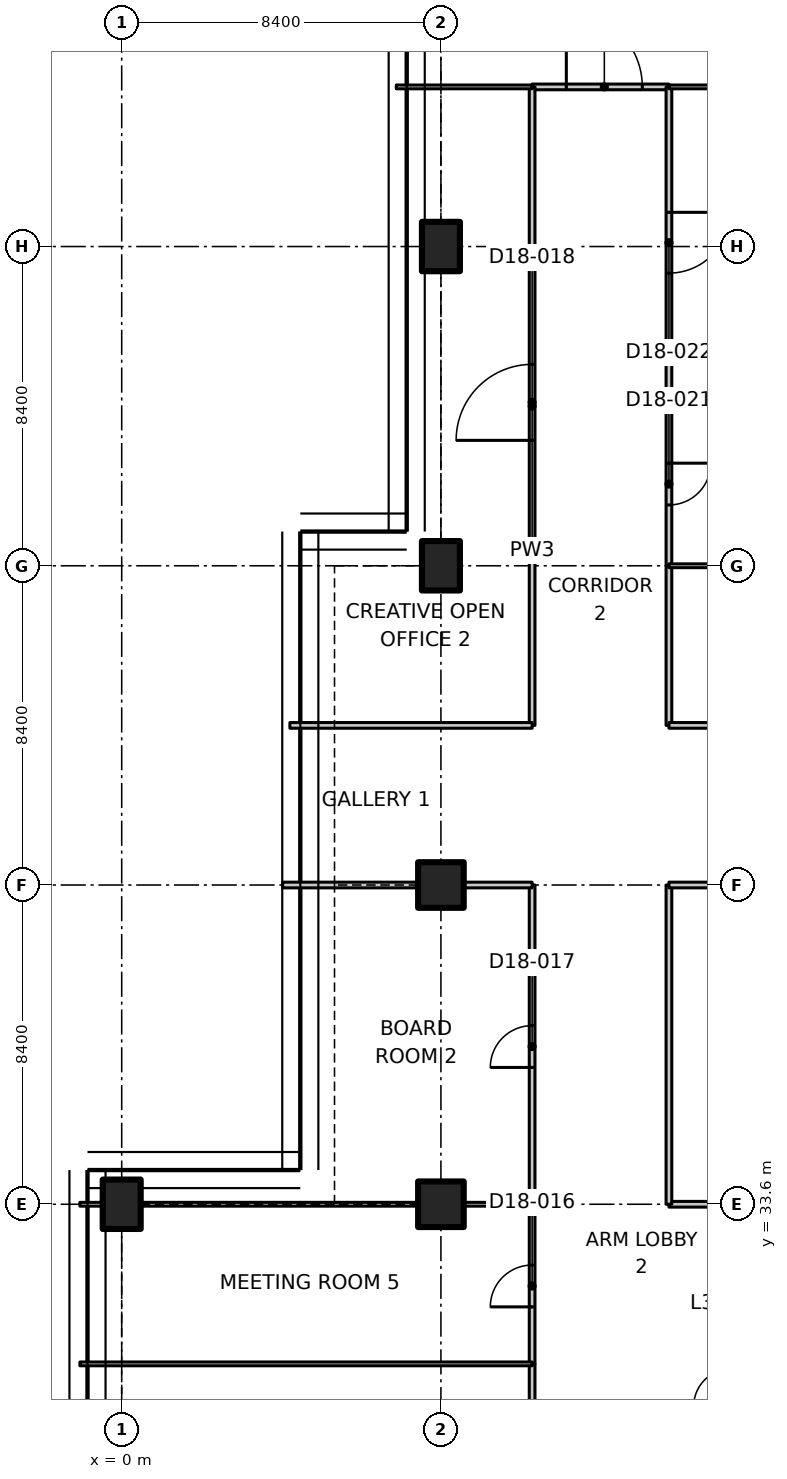
"""IFC4 building model, lengths in metres.
Left out: names, types, materials, properties, quantities, classifications, styles, units other than length and angle.
Written with IfcOpenShell. Run it as: python <this file> out.ifc"""

import sys

from ifc_helpers import new_model, si_unit, direction, frame, frame_2d, origin, origin_2d, place, context, subcontext, project, spatial, polyline, rectangle, outline, extrude, element, fill, save


model = new_model("IFC4")
c1 = context("Model", 3, precision=1e-05, world=origin(), true_north=direction((0.0, 1.0)))
c2 = subcontext(c1, "Body", "Model", "MODEL_VIEW")
j1 = project(units=[si_unit("LENGTHUNIT", "METRE"), si_unit("PLANEANGLEUNIT", "RADIAN")], contexts=[c1])
p1 = place(None, origin())
s1 = spatial("IfcSite", under=j1, at=p1, CompositionType="ELEMENT")
p2 = place(p1, origin())
s2 = spatial("IfcBuilding", under=s1, at=p2, CompositionType="ELEMENT")
p3 = place(p2, frame((0.0, 0.0, 149.3)))
s3 = spatial("IfcBuildingStorey", under=s2, at=p3, CompositionType="ELEMENT", Elevation=149.3)
p4 = place(p3, frame((0.0, 33.6, 0.0), z_axis=(0.0, 0.0, 1.0), x_axis=(1.0, 0.0, 0.0)))
e1 = element("IfcColumn", 1, at=p4, inside=s3, PredefinedType="COLUMN", context=c2, shape_type="SweptSolid", body=[
    extrude(rectangle(XDim=1.0, YDim=1.3, at=origin_2d()), origin(), (0.0, 0.0, 1.0), 3.35),
])
for number, where, z_axis, x_axis in (
    (2, (8.4, 33.6, 0.0), (0.0, 0.0, 1.0), (1.0, 0.0, 0.0)),
    (3, (8.4, 42.0, 0.0), (0.0, 0.0, 1.0), (1.0, 0.0, 0.0)),
):
    element("IfcColumn", number, at=place(p3, frame(where, z_axis=z_axis, x_axis=x_axis)), inside=s3, PredefinedType="COLUMN", context=c2, shape_type="SweptSolid", body=[
        extrude(rectangle(XDim=1.2, YDim=1.2, at=origin_2d()), origin(), (0.0, 0.0, 1.0), 3.35),
    ])
for number, where, z_axis, x_axis in (
    (4, (8.4, 50.4, 0.0), (0.0, 0.0, 1.0), (1.0, 0.0, 0.0)),
    (5, (8.4, 58.8, 0.0), (0.0, 0.0, 1.0), (1.0, 0.0, 0.0)),
):
    element("IfcColumn", number, at=place(p3, frame(where, z_axis=z_axis, x_axis=x_axis)), inside=s3, PredefinedType="COLUMN", context=c2, shape_type="SweptSolid", body=[
        extrude(rectangle(XDim=1.0, YDim=1.3, at=origin_2d()), origin(), (0.0, 0.0, 1.0), 3.35),
    ])
p5 = place(p3, frame((10.8, 25.2, 0.0), z_axis=(0.0, 0.0, 1.0), x_axis=(0.0, 1.0, 0.0)))
e6 = element("IfcWall", 6, at=p5, inside=s3, PredefinedType="PARTITIONING", context=c2, shape_type="SweptSolid", body=[
    extrude(rectangle(XDim=4.2, YDim=0.15, at=frame_2d((2.1, 0.0))), origin(), (0.0, 0.0, 1.0), 3.33),
])
p6 = place(p5, frame((1.5, 0.0, 0.0)))
e7 = element("IfcOpeningElement", 7, at=p6, cuts=e6, PredefinedType="OPENING", context=c2, shape_type="SweptSolid", body=[
    extrude(rectangle(XDim=1.1, YDim=2.1, at=frame_2d((0.55, 1.05))), frame((0.0, 0.085, 0.0), z_axis=(0.0, -1.0, 0.0), x_axis=(1.0, 0.0, 0.0)), (0.0, 0.0, 1.0), 0.17),
])
p7 = place(p3, frame((10.8, 29.4, 0.0), z_axis=(0.0, 0.0, 1.0), x_axis=(0.0, 1.0, 0.0)))
e8 = element("IfcWall", 8, at=p7, inside=s3, PredefinedType="PARTITIONING", context=c2, shape_type="SweptSolid", body=[
    extrude(rectangle(XDim=4.2, YDim=0.15, at=frame_2d((2.1, 0.0))), origin(), (0.0, 0.0, 1.0), 3.33),
])
p8 = place(p7, frame((1.5, 0.0, 0.0)))
e9 = element("IfcOpeningElement", 9, at=p8, cuts=e8, PredefinedType="OPENING", context=c2, shape_type="SweptSolid", body=[
    extrude(rectangle(XDim=1.1, YDim=2.1, at=frame_2d((0.55, 1.05))), frame((0.0, 0.085, 0.0), z_axis=(0.0, -1.0, 0.0), x_axis=(1.0, 0.0, 0.0)), (0.0, 0.0, 1.0), 0.17),
])
p9 = place(p3, frame((14.4, 33.6, 0.0), z_axis=(0.0, 0.0, 1.0), x_axis=(1.0, 0.0, 0.0)))
e10 = element("IfcWall", 10, at=p9, inside=s3, PredefinedType="PARTITIONING", context=c2, shape_type="SweptSolid", body=[
    extrude(rectangle(XDim=1.5, YDim=0.15, at=frame_2d((0.75, 0.0))), origin(), (0.0, 0.0, 1.0), 3.33),
])
p10 = place(p3, frame((10.8, 63.0, 0.0), z_axis=(0.0, 0.0, 1.0), x_axis=(1.0, 0.0, 0.0)))
e11 = element("IfcWall", 11, at=p10, inside=s3, PredefinedType="PARTITIONING", context=c2, shape_type="SweptSolid", body=[
    extrude(rectangle(XDim=3.6, YDim=0.15, at=frame_2d((1.8, 0.0))), origin(), (0.0, 0.0, 1.0), 3.33),
])
p11 = place(p10, frame((0.9, 0.0, 0.0)))
e12 = element("IfcOpeningElement", 12, at=p11, cuts=e11, PredefinedType="OPENING", context=c2, shape_type="SweptSolid", body=[
    extrude(rectangle(XDim=2.0, YDim=2.4, at=frame_2d((1.0, 1.2))), frame((0.0, 0.085, 0.0), z_axis=(0.0, -1.0, 0.0), x_axis=(1.0, 0.0, 0.0)), (0.0, 0.0, 1.0), 0.17),
])
p12 = place(p3, frame((10.8, 33.6, 0.0), z_axis=(0.0, 0.0, 1.0), x_axis=(0.0, 1.0, 0.0)))
e13 = element("IfcWall", 13, at=p12, inside=s3, PredefinedType="PARTITIONING", context=c2, shape_type="SweptSolid", body=[
    extrude(rectangle(XDim=8.4, YDim=0.15, at=frame_2d((4.2, 0.0))), origin(), (0.0, 0.0, 1.0), 3.33),
])
p13 = place(p12, frame((3.6, 0.0, 0.0)))
e14 = element("IfcOpeningElement", 14, at=p13, cuts=e13, PredefinedType="OPENING", context=c2, shape_type="SweptSolid", body=[
    extrude(rectangle(XDim=1.1, YDim=2.1, at=frame_2d((0.55, 1.05))), frame((0.0, 0.085, 0.0), z_axis=(0.0, -1.0, 0.0), x_axis=(1.0, 0.0, 0.0)), (0.0, 0.0, 1.0), 0.17),
])
p14 = place(p3, frame((10.8, 46.2, 0.0), z_axis=(0.0, 0.0, 1.0), x_axis=(0.0, 1.0, 0.0)))
e15 = element("IfcWall", 15, at=p14, inside=s3, PredefinedType="PARTITIONING", context=c2, shape_type="SweptSolid", body=[
    extrude(rectangle(XDim=16.8, YDim=0.15, at=frame_2d((8.4, 0.0))), origin(), (0.0, 0.0, 1.0), 3.33),
])
p15 = place(p14, frame((7.5, 0.0, 0.0)))
e16 = element("IfcOpeningElement", 16, at=p15, cuts=e15, PredefinedType="OPENING", context=c2, shape_type="SweptSolid", body=[
    extrude(rectangle(XDim=2.0, YDim=2.4, at=frame_2d((1.0, 1.2))), frame((0.0, 0.085, 0.0), z_axis=(0.0, -1.0, 0.0), x_axis=(1.0, 0.0, 0.0)), (0.0, 0.0, 1.0), 0.17),
])
p16 = place(p3, frame((14.4, 42.0, 0.0), z_axis=(0.0, 0.0, 1.0), x_axis=(0.0, -1.0, 0.0)))
e17 = element("IfcWall", 17, at=p16, inside=s3, PredefinedType="PARTITIONING", context=c2, shape_type="SweptSolid", body=[
    extrude(rectangle(XDim=8.4, YDim=0.15, at=frame_2d((4.2, 0.0))), origin(), (0.0, 0.0, 1.0), 3.33),
])
p17 = place(p3, frame((14.4, 50.4, 0.0), z_axis=(0.0, 0.0, 1.0), x_axis=(0.0, -1.0, 0.0)))
e18 = element("IfcWall", 18, at=p17, inside=s3, PredefinedType="PARTITIONING", context=c2, shape_type="SweptSolid", body=[
    extrude(rectangle(XDim=4.2, YDim=0.15, at=frame_2d((2.1, 0.0))), origin(), (0.0, 0.0, 1.0), 3.33),
])
p18 = place(p3, frame((14.4, 54.6, 0.0), z_axis=(0.0, 0.0, 1.0), x_axis=(0.0, -1.0, 0.0)))
e19 = element("IfcWall", 19, at=p18, inside=s3, PredefinedType="PARTITIONING", context=c2, shape_type="SweptSolid", body=[
    extrude(rectangle(XDim=4.2, YDim=0.15, at=frame_2d((2.1, 0.0))), origin(), (0.0, 0.0, 1.0), 3.33),
])
p19 = place(p18, frame((1.5, 0.0, 0.0)))
e20 = element("IfcOpeningElement", 20, at=p19, cuts=e19, PredefinedType="OPENING", context=c2, shape_type="SweptSolid", body=[
    extrude(rectangle(XDim=1.1, YDim=2.1, at=frame_2d((0.55, 1.05))), frame((0.0, 0.085, 0.0), z_axis=(0.0, -1.0, 0.0), x_axis=(1.0, 0.0, 0.0)), (0.0, 0.0, 1.0), 0.17),
])
p20 = place(p3, frame((14.4, 63.0, 0.0), z_axis=(0.0, 0.0, 1.0), x_axis=(0.0, -1.0, 0.0)))
e21 = element("IfcWall", 21, at=p20, inside=s3, PredefinedType="PARTITIONING", context=c2, shape_type="SweptSolid", body=[
    extrude(rectangle(XDim=8.4, YDim=0.15, at=frame_2d((4.2, 0.0))), origin(), (0.0, 0.0, 1.0), 3.33),
])
p21 = place(p20, frame((3.3, 0.0, 0.0)))
e22 = element("IfcOpeningElement", 22, at=p21, cuts=e21, PredefinedType="OPENING", context=c2, shape_type="SweptSolid", body=[
    extrude(rectangle(XDim=1.6, YDim=2.1, at=frame_2d((0.8, 1.05))), frame((0.0, 0.085, 0.0), z_axis=(0.0, -1.0, 0.0), x_axis=(1.0, 0.0, 0.0)), (0.0, 0.0, 1.0), 0.17),
])
p22 = place(p3, frame((10.8, 63.0, 0.0), z_axis=(0.0, 0.0, 1.0), x_axis=(-1.0, 0.0, 0.0)))
e23 = element("IfcWall", 23, at=p22, inside=s3, PredefinedType="PARTITIONING", context=c2, shape_type="SweptSolid", body=[
    extrude(rectangle(XDim=3.574, YDim=0.1, at=frame_2d((1.787, 0.0))), origin(), (0.0, 0.0, 1.0), 2.98),
])
p23 = place(p3, frame((25.4, 63.0, 0.0), z_axis=(0.0, 0.0, 1.0), x_axis=(-1.0, 0.0, 0.0)))
e24 = element("IfcWall", 24, at=p23, inside=s3, PredefinedType="PARTITIONING", context=c2, shape_type="SweptSolid", body=[
    extrude(outline(polyline([(0.0, 0.0), (11.0, 0.0), (11.0, 3.33), (5.066, 3.33), (5.064, 2.98), (3.736, 2.98), (3.734, 3.33), (0.0, 3.33), (0.0, 0.0)])), frame((0.0, 0.05, 0.0), z_axis=(0.0, -1.0, 0.0), x_axis=(1.0, 0.0, 0.0)), (0.0, 0.0, 1.0), 0.1),
])
p24 = place(p3, frame((10.8, 42.0, 0.0), z_axis=(0.0, 0.0, 1.0), x_axis=(-1.0, 0.0, 0.0)))
e25 = element("IfcWall", 25, at=p24, inside=s3, PredefinedType="PARTITIONING", context=c2, shape_type="SweptSolid", body=[
    extrude(rectangle(XDim=1.78, YDim=0.15, at=frame_2d((0.89, 0.0))), origin(), (0.0, 0.0, 1.0), 3.33),
])
p25 = place(p3, frame((7.78, 42.0, 0.0), z_axis=(0.0, 0.0, 1.0), x_axis=(-1.0, 0.0, 0.0)))
e26 = element("IfcWall", 26, at=p25, inside=s3, PredefinedType="PARTITIONING", context=c2, shape_type="SweptSolid", body=[
    extrude(rectangle(XDim=3.545, YDim=0.15, at=frame_2d((1.772, 0.0))), origin(), (0.0, 0.0, 1.0), 2.98),
])
p26 = place(p3, frame((4.426, 46.2, 0.0), z_axis=(0.0, 0.0, 1.0), x_axis=(1.0, 0.0, 0.0)))
e27 = element("IfcWall", 27, at=p26, inside=s3, PredefinedType="PARTITIONING", context=c2, shape_type="SweptSolid", body=[
    extrude(outline(polyline([(0.0, 0.0), (6.374, 0.0), (6.374, 3.33), (1.624, 3.33), (1.622, 2.98), (0.726, 2.98), (0.724, 3.33), (0.074, 3.33), (0.0, 3.33), (0.0, 0.0)])), frame((0.0, 0.075, 0.0), z_axis=(0.0, -1.0, 0.0), x_axis=(1.0, 0.0, 0.0)), (0.0, 0.0, 1.0), 0.15),
])
p27 = place(p3, frame((-1.1, 29.4, 0.0), z_axis=(0.0, 0.0, 1.0), x_axis=(1.0, 0.0, 0.0)))
e28 = element("IfcWall", 28, at=p27, inside=s3, PredefinedType="PARTITIONING", context=c2, shape_type="SweptSolid", body=[
    extrude(outline(polyline([(0.0, 0.0), (11.9, 0.0), (11.9, 3.33), (1.55, 3.33), (1.548, 2.98), (0.652, 2.98), (0.65, 3.33), (0.0, 3.33), (0.0, 0.0)])), frame((0.0, 0.05, 0.0), z_axis=(0.0, -1.0, 0.0), x_axis=(1.0, 0.0, 0.0)), (0.0, 0.0, 1.0), 0.1),
])
p28 = place(p3, frame((-1.1, 33.6, 0.0), z_axis=(0.0, 0.0, 1.0), x_axis=(1.0, 0.0, 0.0)))
e29 = element("IfcWall", 29, at=p28, inside=s3, PredefinedType="PARTITIONING", context=c2, shape_type="SweptSolid", body=[
    extrude(rectangle(XDim=0.58, YDim=0.1, at=frame_2d((0.29, 0.0))), origin(), (0.0, 0.0, 1.0), 3.33),
])
p29 = place(p3, frame((0.52, 33.6, 0.0), z_axis=(0.0, 0.0, 1.0), x_axis=(1.0, 0.0, 0.0)))
e30 = element("IfcWall", 30, at=p29, inside=s3, PredefinedType="PARTITIONING", context=c2, shape_type="SweptSolid", body=[
    extrude(outline(polyline([(0.0, 0.0), (7.26, 0.0), (7.26, 2.98), (0.0, 2.98), (0.0, 0.0)])), frame((0.0, 0.05, 0.0), z_axis=(0.0, -1.0, 0.0), x_axis=(1.0, 0.0, 0.0)), (0.0, 0.0, 1.0), 0.1),
])
p30 = place(p3, frame((9.02, 33.6, 0.0), z_axis=(0.0, 0.0, 1.0), x_axis=(1.0, 0.0, 0.0)))
e31 = element("IfcWall", 31, at=p30, inside=s3, PredefinedType="PARTITIONING", context=c2, shape_type="SweptSolid", body=[
    extrude(rectangle(XDim=1.78, YDim=0.1, at=frame_2d((0.89, 0.0))), origin(), (0.0, 0.0, 1.0), 3.33),
])
p31 = place(p3, frame((16.18, 42.0, 0.0), z_axis=(0.0, 0.0, 1.0), x_axis=(-1.0, 0.0, 0.0)))
e32 = element("IfcWall", 32, at=p31, inside=s3, PredefinedType="PARTITIONING", context=c2, shape_type="SweptSolid", body=[
    extrude(rectangle(XDim=1.78, YDim=0.15, at=frame_2d((0.89, 0.0))), origin(), (0.0, 0.0, 1.0), 3.33),
])
p32 = place(p3, frame((14.4, 46.2, 0.0), z_axis=(0.0, 0.0, 1.0), x_axis=(1.0, 0.0, 0.0)))
e33 = element("IfcWall", 33, at=p32, inside=s3, PredefinedType="PARTITIONING", context=c2, shape_type="SweptSolid", body=[
    extrude(outline(polyline([(0.0, 0.0), (12.165, 0.0), (12.165, 3.33), (11.9, 3.33), (11.25, 3.33), (11.248, 2.98), (10.352, 2.98), (10.35, 3.33), (0.0, 3.33), (0.0, 0.0)])), frame((0.0, 0.075, 0.0), z_axis=(0.0, -1.0, 0.0), x_axis=(1.0, 0.0, 0.0)), (0.0, 0.0, 1.0), 0.15),
])
p33 = place(p32, frame((5.4, 0.0, 0.0)))
e34 = element("IfcOpeningElement", 34, at=p33, cuts=e33, PredefinedType="OPENING", context=c2, shape_type="SweptSolid", body=[
    extrude(rectangle(XDim=1.1, YDim=2.1, at=frame_2d((0.55, 1.05))), frame((0.0, 0.085, 0.0), z_axis=(0.0, -1.0, 0.0), x_axis=(1.0, 0.0, 0.0)), (0.0, 0.0, 1.0), 0.17),
])
p34 = place(p3, frame((14.4, 50.4, 0.0), z_axis=(0.0, 0.0, 1.0), x_axis=(1.0, 0.0, 0.0)))
e35 = element("IfcWall", 35, at=p34, inside=s3, PredefinedType="PARTITIONING", context=c2, shape_type="SweptSolid", body=[
    extrude(rectangle(XDim=1.78, YDim=0.1, at=frame_2d((0.89, 0.0))), origin(), (0.0, 0.0, 1.0), 3.33),
])
p35 = place(p3, frame((14.4, 54.6, 0.0), z_axis=(0.0, 0.0, 1.0), x_axis=(1.0, 0.0, 0.0)))
e36 = element("IfcWall", 36, at=p35, inside=s3, PredefinedType="PARTITIONING", context=c2, shape_type="SweptSolid", body=[
    extrude(outline(polyline([(0.0, 0.0), (12.165, 0.0), (12.165, 3.33), (11.9, 3.33), (11.25, 3.33), (11.248, 2.98), (10.352, 2.98), (10.35, 3.33), (0.0, 3.33), (0.0, 0.0)])), frame((0.0, 0.05, 0.0), z_axis=(0.0, -1.0, 0.0), x_axis=(1.0, 0.0, 0.0)), (0.0, 0.0, 1.0), 0.1),
])
p36 = place(p11, origin())
e37 = element("IfcDoor", 37, at=p36, inside=s3, OperationType="DOUBLE_DOOR_SINGLE_SWING", PredefinedType="DOOR", context=c2, shape_type="SweptSolid", body=[
    extrude(rectangle(XDim=2.0, YDim=2.4, at=frame_2d((1.0, 1.2))), frame((0.0, 0.025, 0.0), z_axis=(0.0, -1.0, 0.0), x_axis=(1.0, 0.0, 0.0)), (0.0, 0.0, 1.0), 0.05),
])
fill(e12, e37)
p37 = place(p8, origin())
e38 = element("IfcDoor", 38, at=p37, inside=s3, OperationType="SINGLE_SWING_LEFT", PredefinedType="DOOR", context=c2, shape_type="SweptSolid", body=[
    extrude(rectangle(XDim=1.1, YDim=2.1, at=frame_2d((0.55, 1.05))), frame((0.0, 0.025, 0.0), z_axis=(0.0, -1.0, 0.0), x_axis=(1.0, 0.0, 0.0)), (0.0, 0.0, 1.0), 0.05),
])
fill(e9, e38)
p38 = place(p13, origin())
e39 = element("IfcDoor", 39, at=p38, inside=s3, OperationType="SINGLE_SWING_LEFT", PredefinedType="DOOR", context=c2, shape_type="SweptSolid", body=[
    extrude(rectangle(XDim=1.1, YDim=2.1, at=frame_2d((0.55, 1.05))), frame((0.0, 0.025, 0.0), z_axis=(0.0, -1.0, 0.0), x_axis=(1.0, 0.0, 0.0)), (0.0, 0.0, 1.0), 0.05),
])
fill(e14, e39)
p39 = place(p15, origin())
e40 = element("IfcDoor", 40, at=p39, inside=s3, OperationType="DOUBLE_DOOR_SINGLE_SWING", PredefinedType="DOOR", context=c2, shape_type="SweptSolid", body=[
    extrude(rectangle(XDim=2.0, YDim=2.4, at=frame_2d((1.0, 1.2))), frame((0.0, 0.025, 0.0), z_axis=(0.0, -1.0, 0.0), x_axis=(1.0, 0.0, 0.0)), (0.0, 0.0, 1.0), 0.05),
])
fill(e16, e40)
p40 = place(p19, origin())
e41 = element("IfcDoor", 41, at=p40, inside=s3, OperationType="SINGLE_SWING_LEFT", PredefinedType="DOOR", context=c2, shape_type="SweptSolid", body=[
    extrude(rectangle(XDim=1.1, YDim=2.1, at=frame_2d((0.55, 1.05))), frame((0.0, 0.025, 0.0), z_axis=(0.0, -1.0, 0.0), x_axis=(1.0, 0.0, 0.0)), (0.0, 0.0, 1.0), 0.05),
])
fill(e20, e41)
p41 = place(p21, origin())
e42 = element("IfcDoor", 42, at=p41, inside=s3, OperationType="DOUBLE_DOOR_SINGLE_SWING", PredefinedType="DOOR", context=c2, shape_type="SweptSolid", body=[
    extrude(rectangle(XDim=1.6, YDim=2.1, at=frame_2d((0.8, 1.05))), frame((0.0, 0.025, 0.0), z_axis=(0.0, -1.0, 0.0), x_axis=(1.0, 0.0, 0.0)), (0.0, 0.0, 1.0), 0.05),
])
fill(e22, e42)
save(model, sys.argv[1])
